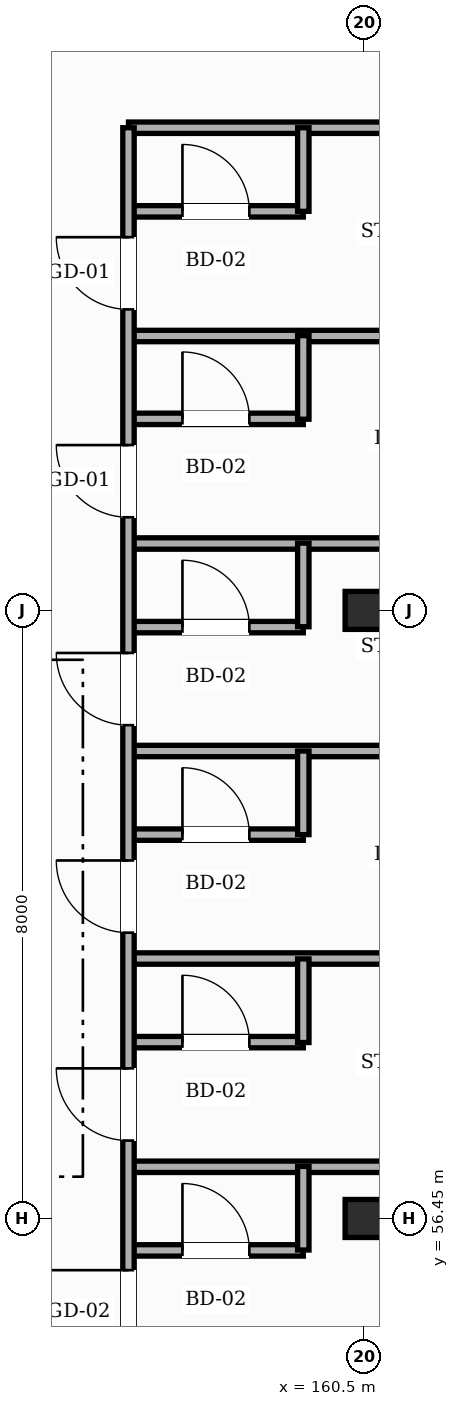
"""IFC4 building model, lengths in metres.
Left out: names, types, materials, properties, quantities, classifications, styles, units other than length and angle.
Written with IfcOpenShell. Run it as: python <this file> out.ifc"""

import sys

from ifc_helpers import new_model, si_unit, direction, frame, frame_2d, origin, origin_2d, place, context, subcontext, project, spatial, rectangle, hollow_rectangle, extrude, element, fill, save


model = new_model("IFC4")
c1 = context("Model", 3, precision=1e-05, world=origin(), true_north=direction((0.0, 1.0)))
c2 = subcontext(c1, "Body", "Model", "MODEL_VIEW")
j1 = project(units=[si_unit("LENGTHUNIT", "METRE"), si_unit("PLANEANGLEUNIT", "RADIAN")], contexts=[c1])
p1 = place(None, origin())
s1 = spatial("IfcSite", under=j1, at=p1, CompositionType="ELEMENT")
p2 = place(p1, origin())
s2 = spatial("IfcBuilding", under=s1, at=p2, CompositionType="ELEMENT")
p3 = place(p2, frame((0.0, 0.0, 35.4)))
s3 = spatial("IfcBuildingStorey", under=s2, at=p3, CompositionType="ELEMENT", Elevation=35.4)
for number, where, z_axis, x_axis in (
    (1, (160.5, 56.45, 0.0), (0.0, 0.0, 1.0), (1.0, 0.0, 0.0)),
    (2, (160.5, 64.45, 0.0), (0.0, 0.0, 1.0), (1.0, 0.0, 0.0)),
):
    element("IfcColumn", number, at=place(p3, frame(where, z_axis=z_axis, x_axis=x_axis)), inside=s3, PredefinedType="COLUMN", context=c2, shape_type="SweptSolid", body=[
        extrude(hollow_rectangle(XDim=0.5, YDim=0.5, WallThickness=0.022, InnerFilletRadius=0.022, OuterFilletRadius=0.044, at=origin_2d()), origin(), (0.0, 0.0, 1.0), 3.6),
    ])
p4 = place(p3, frame((157.4, 56.03, 0.0), z_axis=(0.0, 0.0, 1.0), x_axis=(1.0, 0.0, 0.0)))
e3 = element("IfcWall", 3, at=p4, inside=s3, PredefinedType="PARTITIONING", context=c2, shape_type="SweptSolid", body=[
    extrude(rectangle(XDim=2.3, YDim=0.15, at=frame_2d((1.15, 0.0))), origin(), (0.0, 0.0, 1.0), 3.365),
])
p5 = place(p4, frame((0.71, 0.0, 0.0)))
e4 = element("IfcOpeningElement", 4, at=p5, cuts=e3, PredefinedType="OPENING", context=c2, shape_type="SweptSolid", body=[
    extrude(rectangle(XDim=0.88, YDim=2.12, at=frame_2d((0.44, 1.06))), frame((0.0, 0.085, 0.0), z_axis=(0.0, -1.0, 0.0), x_axis=(1.0, 0.0, 0.0)), (0.0, 0.0, 1.0), 0.17),
])
p6 = place(p3, frame((157.4, 57.13, 0.0), z_axis=(0.0, 0.0, 1.0), x_axis=(1.0, 0.0, 0.0)))
e5 = element("IfcWall", 5, at=p6, inside=s3, PredefinedType="PARTITIONING", context=c2, shape_type="SweptSolid", body=[
    extrude(rectangle(XDim=9.8, YDim=0.15, at=frame_2d((4.9, 0.0))), origin(), (0.0, 0.0, 1.0), 3.365),
])
p7 = place(p3, frame((157.4, 58.77, 0.0), z_axis=(0.0, 0.0, 1.0), x_axis=(1.0, 0.0, 0.0)))
e6 = element("IfcWall", 6, at=p7, inside=s3, PredefinedType="PARTITIONING", context=c2, shape_type="SweptSolid", body=[
    extrude(rectangle(XDim=2.3, YDim=0.15, at=frame_2d((1.15, 0.0))), origin(), (0.0, 0.0, 1.0), 3.365),
])
p8 = place(p7, frame((0.71, 0.0, 0.0)))
e7 = element("IfcOpeningElement", 7, at=p8, cuts=e6, PredefinedType="OPENING", context=c2, shape_type="SweptSolid", body=[
    extrude(rectangle(XDim=0.88, YDim=2.12, at=frame_2d((0.44, 1.06))), frame((0.0, 0.085, 0.0), z_axis=(0.0, -1.0, 0.0), x_axis=(1.0, 0.0, 0.0)), (0.0, 0.0, 1.0), 0.17),
])
p9 = place(p3, frame((157.4, 59.87, 0.0), z_axis=(0.0, 0.0, 1.0), x_axis=(1.0, 0.0, 0.0)))
e8 = element("IfcWall", 8, at=p9, inside=s3, PredefinedType="PARTITIONING", context=c2, shape_type="SweptSolid", body=[
    extrude(rectangle(XDim=9.8, YDim=0.15, at=frame_2d((4.9, 0.0))), origin(), (0.0, 0.0, 1.0), 3.365),
])
p10 = place(p3, frame((157.4, 61.5, 0.0), z_axis=(0.0, 0.0, 1.0), x_axis=(1.0, 0.0, 0.0)))
e9 = element("IfcWall", 9, at=p10, inside=s3, PredefinedType="PARTITIONING", context=c2, shape_type="SweptSolid", body=[
    extrude(rectangle(XDim=2.3, YDim=0.15, at=frame_2d((1.15, 0.0))), origin(), (0.0, 0.0, 1.0), 3.365),
])
p11 = place(p10, frame((0.71, 0.0, 0.0)))
e10 = element("IfcOpeningElement", 10, at=p11, cuts=e9, PredefinedType="OPENING", context=c2, shape_type="SweptSolid", body=[
    extrude(rectangle(XDim=0.88, YDim=2.12, at=frame_2d((0.44, 1.06))), frame((0.0, 0.085, 0.0), z_axis=(0.0, -1.0, 0.0), x_axis=(1.0, 0.0, 0.0)), (0.0, 0.0, 1.0), 0.17),
])
p12 = place(p3, frame((157.4, 62.6, 0.0), z_axis=(0.0, 0.0, 1.0), x_axis=(1.0, 0.0, 0.0)))
e11 = element("IfcWall", 11, at=p12, inside=s3, PredefinedType="PARTITIONING", context=c2, shape_type="SweptSolid", body=[
    extrude(rectangle(XDim=9.8, YDim=0.15, at=frame_2d((4.9, 0.0))), origin(), (0.0, 0.0, 1.0), 3.365),
])
p13 = place(p3, frame((157.4, 64.23, 0.0), z_axis=(0.0, 0.0, 1.0), x_axis=(1.0, 0.0, 0.0)))
e12 = element("IfcWall", 12, at=p13, inside=s3, PredefinedType="PARTITIONING", context=c2, shape_type="SweptSolid", body=[
    extrude(rectangle(XDim=2.3, YDim=0.15, at=frame_2d((1.15, 0.0))), origin(), (0.0, 0.0, 1.0), 2.755),
])
p14 = place(p13, frame((0.71, 0.0, 0.0)))
e13 = element("IfcOpeningElement", 13, at=p14, cuts=e12, PredefinedType="OPENING", context=c2, shape_type="SweptSolid", body=[
    extrude(rectangle(XDim=0.88, YDim=2.12, at=frame_2d((0.44, 1.06))), frame((0.0, 0.085, 0.0), z_axis=(0.0, -1.0, 0.0), x_axis=(1.0, 0.0, 0.0)), (0.0, 0.0, 1.0), 0.17),
])
p15 = place(p3, frame((157.4, 65.33, 0.0), z_axis=(0.0, 0.0, 1.0), x_axis=(1.0, 0.0, 0.0)))
e14 = element("IfcWall", 14, at=p15, inside=s3, PredefinedType="PARTITIONING", context=c2, shape_type="SweptSolid", body=[
    extrude(rectangle(XDim=9.8, YDim=0.15, at=frame_2d((4.9, 0.0))), origin(), (0.0, 0.0, 1.0), 3.365),
])
p16 = place(p3, frame((157.4, 66.97, 0.0), z_axis=(0.0, 0.0, 1.0), x_axis=(1.0, 0.0, 0.0)))
e15 = element("IfcWall", 15, at=p16, inside=s3, PredefinedType="PARTITIONING", context=c2, shape_type="SweptSolid", body=[
    extrude(rectangle(XDim=2.3, YDim=0.15, at=frame_2d((1.15, 0.0))), origin(), (0.0, 0.0, 1.0), 3.365),
])
p17 = place(p16, frame((0.71, 0.0, 0.0)))
e16 = element("IfcOpeningElement", 16, at=p17, cuts=e15, PredefinedType="OPENING", context=c2, shape_type="SweptSolid", body=[
    extrude(rectangle(XDim=0.88, YDim=2.12, at=frame_2d((0.44, 1.06))), frame((0.0, 0.085, 0.0), z_axis=(0.0, -1.0, 0.0), x_axis=(1.0, 0.0, 0.0)), (0.0, 0.0, 1.0), 0.17),
])
p18 = place(p3, frame((157.4, 68.06, 0.0), z_axis=(0.0, 0.0, 1.0), x_axis=(1.0, 0.0, 0.0)))
e17 = element("IfcWall", 17, at=p18, inside=s3, PredefinedType="PARTITIONING", context=c2, shape_type="SweptSolid", body=[
    extrude(rectangle(XDim=9.8, YDim=0.15, at=frame_2d((4.9, 0.0))), origin(), (0.0, 0.0, 1.0), 3.365),
])
p19 = place(p3, frame((157.4, 69.7, 0.0), z_axis=(0.0, 0.0, 1.0), x_axis=(1.0, 0.0, 0.0)))
e18 = element("IfcWall", 18, at=p19, inside=s3, PredefinedType="PARTITIONING", context=c2, shape_type="SweptSolid", body=[
    extrude(rectangle(XDim=2.3, YDim=0.15, at=frame_2d((1.15, 0.0))), origin(), (0.0, 0.0, 1.0), 3.365),
])
p20 = place(p19, frame((0.71, 0.0, 0.0)))
e19 = element("IfcOpeningElement", 19, at=p20, cuts=e18, PredefinedType="OPENING", context=c2, shape_type="SweptSolid", body=[
    extrude(rectangle(XDim=0.88, YDim=2.12, at=frame_2d((0.44, 1.06))), frame((0.0, 0.085, 0.0), z_axis=(0.0, -1.0, 0.0), x_axis=(1.0, 0.0, 0.0)), (0.0, 0.0, 1.0), 0.17),
])
p21 = place(p3, frame((157.4, 70.8, 0.0), z_axis=(0.0, 0.0, 1.0), x_axis=(1.0, 0.0, 0.0)))
e20 = element("IfcWall", 20, at=p21, inside=s3, PredefinedType="PARTITIONING", context=c2, shape_type="SweptSolid", body=[
    extrude(rectangle(XDim=9.8, YDim=0.15, at=frame_2d((4.9, 0.0))), origin(), (0.0, 0.0, 1.0), 3.365),
])
p22 = place(p3, frame((157.4, 22.3, 0.0), z_axis=(0.0, 0.0, 1.0), x_axis=(0.0, 1.0, 0.0)))
e21 = element("IfcWall", 21, at=p22, inside=s3, PredefinedType="PARTITIONING", context=c2, shape_type="SweptSolid", body=[
    extrude(rectangle(XDim=48.5, YDim=0.15, at=frame_2d((24.25, 0.0))), origin(), (0.0, 0.0, 1.0), 3.365),
])
p23 = place(p22, frame((24.875, 0.0, 0.0)))
e22 = element("IfcOpeningElement", 22, at=p23, cuts=e21, PredefinedType="OPENING", context=c2, shape_type="SweptSolid", body=[
    extrude(rectangle(XDim=1.65, YDim=2.35, at=frame_2d((0.825, 1.175))), frame((0.0, 0.085, 0.0), z_axis=(0.0, -1.0, 0.0), x_axis=(1.0, 0.0, 0.0)), (0.0, 0.0, 1.0), 0.17),
])
p24 = place(p22, frame((0.275, 0.0, 0.0)))
e23 = element("IfcOpeningElement", 23, at=p24, cuts=e21, PredefinedType="OPENING", context=c2, shape_type="SweptSolid", body=[
    extrude(rectangle(XDim=1.1, YDim=2.2, at=frame_2d((0.55, 1.1))), frame((0.0, 0.085, 0.0), z_axis=(0.0, -1.0, 0.0), x_axis=(1.0, 0.0, 0.0)), (0.0, 0.0, 1.0), 0.17),
])
p25 = place(p22, frame((3.11, 0.0, 0.0)))
e24 = element("IfcOpeningElement", 24, at=p25, cuts=e21, PredefinedType="OPENING", context=c2, shape_type="SweptSolid", body=[
    extrude(rectangle(XDim=0.95, YDim=2.15, at=frame_2d((0.475, 1.075))), frame((0.0, 0.085, 0.0), z_axis=(0.0, -1.0, 0.0), x_axis=(1.0, 0.0, 0.0)), (0.0, 0.0, 1.0), 0.17),
])
p26 = place(p22, frame((5.865, 0.0, 0.0)))
e25 = element("IfcOpeningElement", 25, at=p26, cuts=e21, PredefinedType="OPENING", context=c2, shape_type="SweptSolid", body=[
    extrude(rectangle(XDim=0.95, YDim=2.15, at=frame_2d((0.475, 1.075))), frame((0.0, 0.085, 0.0), z_axis=(0.0, -1.0, 0.0), x_axis=(1.0, 0.0, 0.0)), (0.0, 0.0, 1.0), 0.17),
])
p27 = place(p22, frame((8.625, 0.0, 0.0)))
e26 = element("IfcOpeningElement", 26, at=p27, cuts=e21, PredefinedType="OPENING", context=c2, shape_type="SweptSolid", body=[
    extrude(rectangle(XDim=0.95, YDim=2.15, at=frame_2d((0.475, 1.075))), frame((0.0, 0.085, 0.0), z_axis=(0.0, -1.0, 0.0), x_axis=(1.0, 0.0, 0.0)), (0.0, 0.0, 1.0), 0.17),
])
p28 = place(p22, frame((11.38, 0.0, 0.0)))
e27 = element("IfcOpeningElement", 27, at=p28, cuts=e21, PredefinedType="OPENING", context=c2, shape_type="SweptSolid", body=[
    extrude(rectangle(XDim=0.95, YDim=2.15, at=frame_2d((0.475, 1.075))), frame((0.0, 0.085, 0.0), z_axis=(0.0, -1.0, 0.0), x_axis=(1.0, 0.0, 0.0)), (0.0, 0.0, 1.0), 0.17),
])
p29 = place(p22, frame((14.14, 0.0, 0.0)))
e28 = element("IfcOpeningElement", 28, at=p29, cuts=e21, PredefinedType="OPENING", context=c2, shape_type="SweptSolid", body=[
    extrude(rectangle(XDim=0.95, YDim=2.15, at=frame_2d((0.475, 1.075))), frame((0.0, 0.085, 0.0), z_axis=(0.0, -1.0, 0.0), x_axis=(1.0, 0.0, 0.0)), (0.0, 0.0, 1.0), 0.17),
])
p30 = place(p22, frame((16.895, 0.0, 0.0)))
e29 = element("IfcOpeningElement", 29, at=p30, cuts=e21, PredefinedType="OPENING", context=c2, shape_type="SweptSolid", body=[
    extrude(rectangle(XDim=0.95, YDim=2.15, at=frame_2d((0.475, 1.075))), frame((0.0, 0.085, 0.0), z_axis=(0.0, -1.0, 0.0), x_axis=(1.0, 0.0, 0.0)), (0.0, 0.0, 1.0), 0.17),
])
p31 = place(p22, frame((32.37, 0.0, 0.0)))
e30 = element("IfcOpeningElement", 30, at=p31, cuts=e21, PredefinedType="OPENING", context=c2, shape_type="SweptSolid", body=[
    extrude(rectangle(XDim=1.1, YDim=2.2, at=frame_2d((0.55, 1.1))), frame((0.0, 0.085, 0.0), z_axis=(0.0, -1.0, 0.0), x_axis=(1.0, 0.0, 0.0)), (0.0, 0.0, 1.0), 0.17),
])
p32 = place(p22, frame((35.175, 0.0, 0.0)))
e31 = element("IfcOpeningElement", 31, at=p32, cuts=e21, PredefinedType="OPENING", context=c2, shape_type="SweptSolid", body=[
    extrude(rectangle(XDim=0.95, YDim=2.15, at=frame_2d((0.475, 1.075))), frame((0.0, 0.085, 0.0), z_axis=(0.0, -1.0, 0.0), x_axis=(1.0, 0.0, 0.0)), (0.0, 0.0, 1.0), 0.17),
])
p33 = place(p22, frame((37.91, 0.0, 0.0)))
e32 = element("IfcOpeningElement", 32, at=p33, cuts=e21, PredefinedType="OPENING", context=c2, shape_type="SweptSolid", body=[
    extrude(rectangle(XDim=0.95, YDim=2.15, at=frame_2d((0.475, 1.075))), frame((0.0, 0.085, 0.0), z_axis=(0.0, -1.0, 0.0), x_axis=(1.0, 0.0, 0.0)), (0.0, 0.0, 1.0), 0.17),
])
p34 = place(p22, frame((40.64, 0.0, 0.0)))
e33 = element("IfcOpeningElement", 33, at=p34, cuts=e21, PredefinedType="OPENING", context=c2, shape_type="SweptSolid", body=[
    extrude(rectangle(XDim=0.95, YDim=2.15, at=frame_2d((0.475, 1.075))), frame((0.0, 0.085, 0.0), z_axis=(0.0, -1.0, 0.0), x_axis=(1.0, 0.0, 0.0)), (0.0, 0.0, 1.0), 0.17),
])
p35 = place(p22, frame((43.375, 0.0, 0.0)))
e34 = element("IfcOpeningElement", 34, at=p35, cuts=e21, PredefinedType="OPENING", context=c2, shape_type="SweptSolid", body=[
    extrude(rectangle(XDim=0.95, YDim=2.15, at=frame_2d((0.475, 1.075))), frame((0.0, 0.085, 0.0), z_axis=(0.0, -1.0, 0.0), x_axis=(1.0, 0.0, 0.0)), (0.0, 0.0, 1.0), 0.17),
])
p36 = place(p22, frame((46.11, 0.0, 0.0)))
e35 = element("IfcOpeningElement", 35, at=p36, cuts=e21, PredefinedType="OPENING", context=c2, shape_type="SweptSolid", body=[
    extrude(rectangle(XDim=0.95, YDim=2.15, at=frame_2d((0.475, 1.075))), frame((0.0, 0.085, 0.0), z_axis=(0.0, -1.0, 0.0), x_axis=(1.0, 0.0, 0.0)), (0.0, 0.0, 1.0), 0.17),
])
for number, where, z_axis, x_axis in (
    (36, (159.7, 56.035, 0.0), (0.0, 0.0, 1.0), (0.0, 1.0, 0.0)),
    (37, (159.7, 58.765, 0.0), (0.0, 0.0, 1.0), (0.0, 1.0, 0.0)),
    (38, (159.7, 61.5, 0.0), (0.0, 0.0, 1.0), (0.0, 1.0, 0.0)),
):
    element("IfcWall", number, at=place(p3, frame(where, z_axis=z_axis, x_axis=x_axis)), inside=s3, PredefinedType="PARTITIONING", context=c2, shape_type="SweptSolid", body=[
        extrude(rectangle(XDim=1.1, YDim=0.15, at=frame_2d((0.55, 0.0))), origin(), (0.0, 0.0, 1.0), 3.365),
    ])
for number, where, z_axis, x_axis in (
    (39, (159.7, 64.235, 0.0), (0.0, 0.0, 1.0), (0.0, 1.0, 0.0)),
    (40, (159.7, 66.965, 0.0), (0.0, 0.0, 1.0), (0.0, 1.0, 0.0)),
):
    element("IfcWall", number, at=place(p3, frame(where, z_axis=z_axis, x_axis=x_axis)), inside=s3, PredefinedType="PARTITIONING", context=c2, shape_type="SweptSolid", body=[
        extrude(rectangle(XDim=1.1, YDim=0.15, at=frame_2d((0.55, 0.0))), origin(), (0.0, 0.0, 1.0), 3.365),
    ])
p37 = place(p3, frame((159.7, 69.7, 0.0), z_axis=(0.0, 0.0, 1.0), x_axis=(0.0, 1.0, 0.0)))
e41 = element("IfcWall", 41, at=p37, inside=s3, PredefinedType="PARTITIONING", context=c2, shape_type="SweptSolid", body=[
    extrude(rectangle(XDim=1.1, YDim=0.15, at=frame_2d((0.55, 0.0))), origin(), (0.0, 0.0, 1.0), 3.365),
])
p38 = place(p31, origin())
e42 = element("IfcDoor", 42, at=p38, inside=s3, OperationType="SINGLE_SWING_RIGHT", PredefinedType="DOOR", context=c2, shape_type="SweptSolid", body=[
    extrude(rectangle(XDim=1.1, YDim=2.2, at=frame_2d((0.55, 1.1))), frame((0.0, 0.025, 0.0), z_axis=(0.0, -1.0, 0.0), x_axis=(1.0, 0.0, 0.0)), (0.0, 0.0, 1.0), 0.05),
])
fill(e30, e42)
p39 = place(p5, origin())
e43 = element("IfcDoor", 43, at=p39, inside=s3, OperationType="SINGLE_SWING_LEFT", PredefinedType="DOOR", context=c2, shape_type="SweptSolid", body=[
    extrude(rectangle(XDim=0.88, YDim=2.12, at=frame_2d((0.44, 1.06))), frame((0.0, 0.025, 0.0), z_axis=(0.0, -1.0, 0.0), x_axis=(1.0, 0.0, 0.0)), (0.0, 0.0, 1.0), 0.05),
])
fill(e4, e43)
p40 = place(p32, origin())
e44 = element("IfcDoor", 44, at=p40, inside=s3, OperationType="SINGLE_SWING_RIGHT", PredefinedType="DOOR", context=c2, shape_type="SweptSolid", body=[
    extrude(rectangle(XDim=0.95, YDim=2.15, at=frame_2d((0.475, 1.075))), frame((0.0, 0.025, 0.0), z_axis=(0.0, -1.0, 0.0), x_axis=(1.0, 0.0, 0.0)), (0.0, 0.0, 1.0), 0.05),
])
fill(e31, e44)
p41 = place(p8, origin())
e45 = element("IfcDoor", 45, at=p41, inside=s3, OperationType="SINGLE_SWING_LEFT", PredefinedType="DOOR", context=c2, shape_type="SweptSolid", body=[
    extrude(rectangle(XDim=0.88, YDim=2.12, at=frame_2d((0.44, 1.06))), frame((0.0, 0.025, 0.0), z_axis=(0.0, -1.0, 0.0), x_axis=(1.0, 0.0, 0.0)), (0.0, 0.0, 1.0), 0.05),
])
fill(e7, e45)
p42 = place(p33, origin())
e46 = element("IfcDoor", 46, at=p42, inside=s3, OperationType="SINGLE_SWING_RIGHT", PredefinedType="DOOR", context=c2, shape_type="SweptSolid", body=[
    extrude(rectangle(XDim=0.95, YDim=2.15, at=frame_2d((0.475, 1.075))), frame((0.0, 0.025, 0.0), z_axis=(0.0, -1.0, 0.0), x_axis=(1.0, 0.0, 0.0)), (0.0, 0.0, 1.0), 0.05),
])
fill(e32, e46)
p43 = place(p11, origin())
e47 = element("IfcDoor", 47, at=p43, inside=s3, OperationType="SINGLE_SWING_LEFT", PredefinedType="DOOR", context=c2, shape_type="SweptSolid", body=[
    extrude(rectangle(XDim=0.88, YDim=2.12, at=frame_2d((0.44, 1.06))), frame((0.0, 0.025, 0.0), z_axis=(0.0, -1.0, 0.0), x_axis=(1.0, 0.0, 0.0)), (0.0, 0.0, 1.0), 0.05),
])
fill(e10, e47)
p44 = place(p34, origin())
e48 = element("IfcDoor", 48, at=p44, inside=s3, OperationType="SINGLE_SWING_RIGHT", PredefinedType="DOOR", context=c2, shape_type="SweptSolid", body=[
    extrude(rectangle(XDim=0.95, YDim=2.15, at=frame_2d((0.475, 1.075))), frame((0.0, 0.025, 0.0), z_axis=(0.0, -1.0, 0.0), x_axis=(1.0, 0.0, 0.0)), (0.0, 0.0, 1.0), 0.05),
])
fill(e33, e48)
p45 = place(p14, origin())
e49 = element("IfcDoor", 49, at=p45, inside=s3, OperationType="SINGLE_SWING_LEFT", PredefinedType="DOOR", context=c2, shape_type="SweptSolid", body=[
    extrude(rectangle(XDim=0.88, YDim=2.12, at=frame_2d((0.44, 1.06))), frame((0.0, 0.025, 0.0), z_axis=(0.0, -1.0, 0.0), x_axis=(1.0, 0.0, 0.0)), (0.0, 0.0, 1.0), 0.05),
])
fill(e13, e49)
p46 = place(p35, origin())
e50 = element("IfcDoor", 50, at=p46, inside=s3, OperationType="SINGLE_SWING_RIGHT", PredefinedType="DOOR", context=c2, shape_type="SweptSolid", body=[
    extrude(rectangle(XDim=0.95, YDim=2.15, at=frame_2d((0.475, 1.075))), frame((0.0, 0.025, 0.0), z_axis=(0.0, -1.0, 0.0), x_axis=(1.0, 0.0, 0.0)), (0.0, 0.0, 1.0), 0.05),
])
fill(e34, e50)
p47 = place(p17, origin())
e51 = element("IfcDoor", 51, at=p47, inside=s3, OperationType="SINGLE_SWING_LEFT", PredefinedType="DOOR", context=c2, shape_type="SweptSolid", body=[
    extrude(rectangle(XDim=0.88, YDim=2.12, at=frame_2d((0.44, 1.06))), frame((0.0, 0.025, 0.0), z_axis=(0.0, -1.0, 0.0), x_axis=(1.0, 0.0, 0.0)), (0.0, 0.0, 1.0), 0.05),
])
fill(e16, e51)
p48 = place(p36, origin())
e52 = element("IfcDoor", 52, at=p48, inside=s3, OperationType="SINGLE_SWING_RIGHT", PredefinedType="DOOR", context=c2, shape_type="SweptSolid", body=[
    extrude(rectangle(XDim=0.95, YDim=2.15, at=frame_2d((0.475, 1.075))), frame((0.0, 0.025, 0.0), z_axis=(0.0, -1.0, 0.0), x_axis=(1.0, 0.0, 0.0)), (0.0, 0.0, 1.0), 0.05),
])
fill(e35, e52)
p49 = place(p20, origin())
e53 = element("IfcDoor", 53, at=p49, inside=s3, OperationType="SINGLE_SWING_LEFT", PredefinedType="DOOR", context=c2, shape_type="SweptSolid", body=[
    extrude(rectangle(XDim=0.88, YDim=2.12, at=frame_2d((0.44, 1.06))), frame((0.0, 0.025, 0.0), z_axis=(0.0, -1.0, 0.0), x_axis=(1.0, 0.0, 0.0)), (0.0, 0.0, 1.0), 0.05),
])
fill(e19, e53)
save(model, sys.argv[1])
